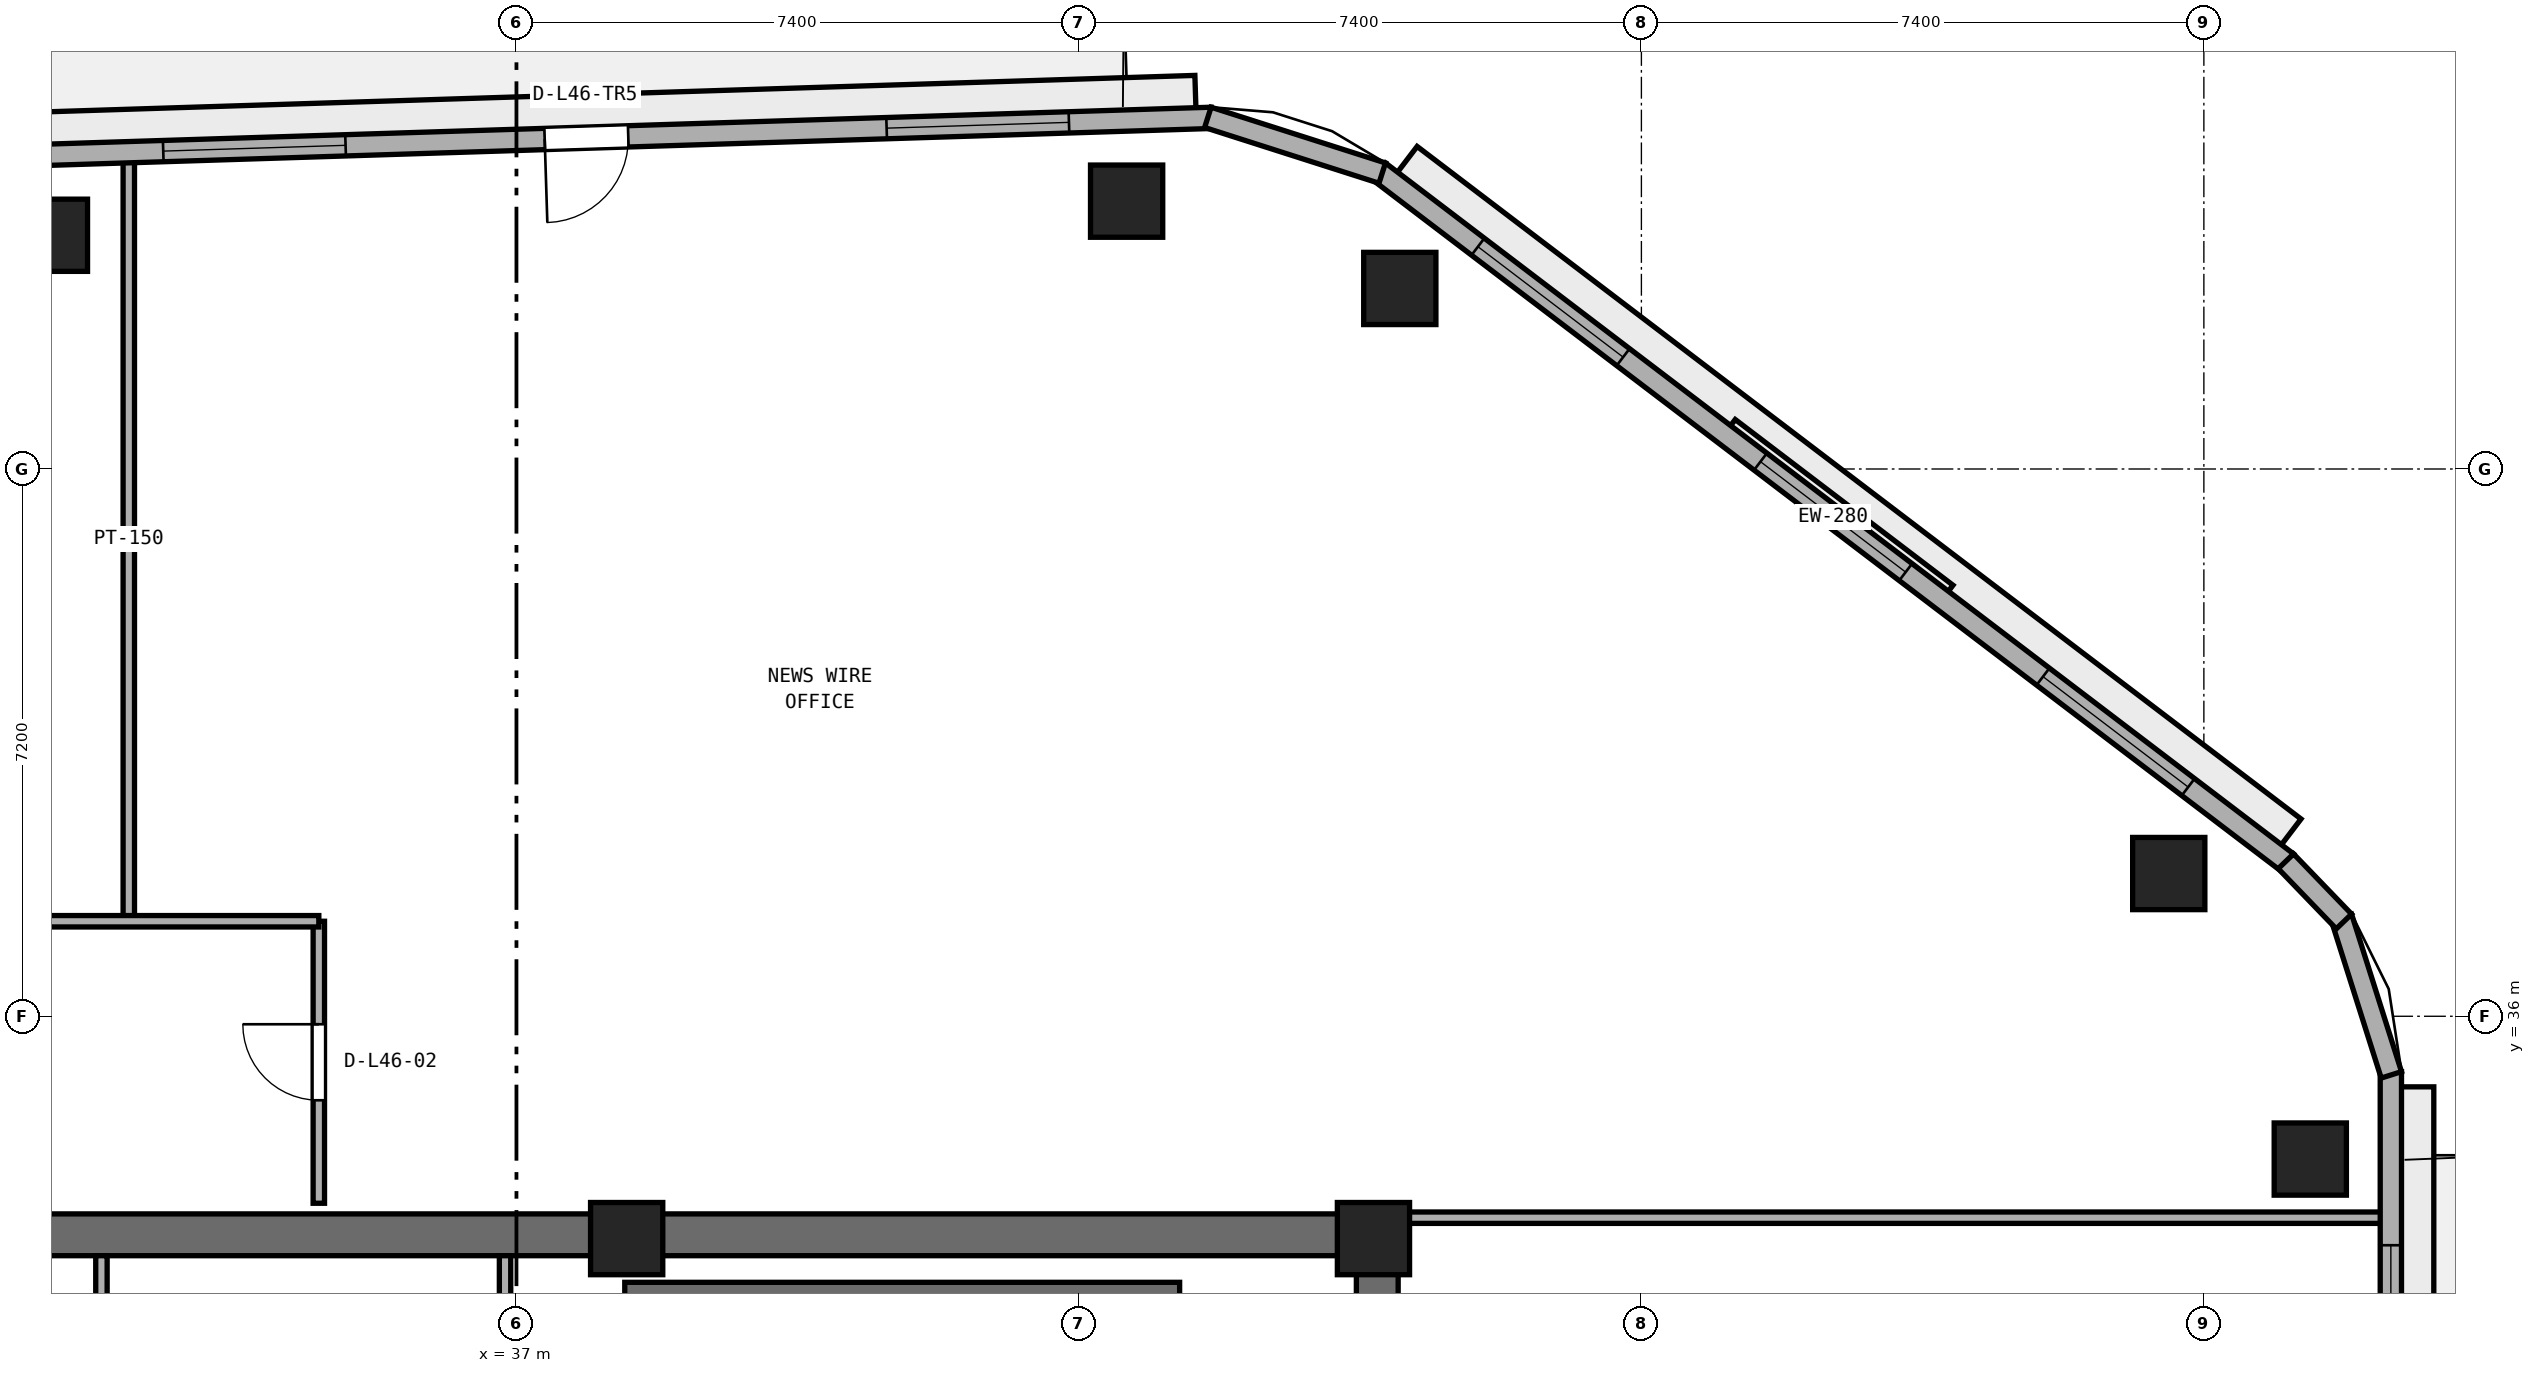
"""IFC4 building model, lengths in metres.
Left out: names, types, materials, properties, quantities, classifications, styles, units other than length and angle.
Written with IfcOpenShell. Run it as: python <this file> out.ifc"""

import sys

from ifc_helpers import new_model, si_unit, direction, frame, frame_2d, origin, origin_2d, place, context, subcontext, project, spatial, rectangle, extrude, element, fill, save


model = new_model("IFC4")
c1 = context("Model", 3, precision=1e-05, world=origin(), true_north=direction((0.0, 1.0)))
c2 = subcontext(c1, "Body", "Model", "MODEL_VIEW")
j1 = project(units=[si_unit("LENGTHUNIT", "METRE"), si_unit("PLANEANGLEUNIT", "RADIAN")], contexts=[c1])
p1 = place(None, origin())
s1 = spatial("IfcSite", under=j1, at=p1, CompositionType="ELEMENT")
p2 = place(p1, origin())
s2 = spatial("IfcBuilding", under=s1, at=p2, CompositionType="ELEMENT")
p3 = place(p2, frame((0.0, 0.0, 182.0)))
s3 = spatial("IfcBuildingStorey", under=s2, at=p3, CompositionType="ELEMENT", Elevation=182.0)
p4 = place(p3, frame((25.4, 33.125, 0.0), z_axis=(0.0, 0.0, 1.0), x_axis=(1.0, 0.0, 0.0)))
e1 = element("IfcWall", 1, at=p4, inside=s3, PredefinedType="SHEAR", context=c2, shape_type="SweptSolid", body=[
    extrude(rectangle(XDim=23.2, YDim=0.55, at=frame_2d((11.6, 0.0))), origin(), (0.0, 0.0, 1.0), 3.54),
])
p5 = place(p3, frame((48.325, 17.55, 0.0), z_axis=(0.0, 0.0, 1.0), x_axis=(0.0, 1.0, 0.0)))
e2 = element("IfcWall", 2, at=p5, inside=s3, PredefinedType="SHEAR", context=c2, shape_type="SweptSolid", body=[
    extrude(rectangle(XDim=15.3, YDim=0.55, at=frame_2d((7.65, 0.0))), origin(), (0.0, 0.0, 1.0), 3.54),
])
p6 = place(p5, frame((5.75, 0.0, 0.0)))
e3 = element("IfcOpeningElement", 3, at=p6, cuts=e2, PredefinedType="OPENING", context=c2, shape_type="SweptSolid", body=[
    extrude(rectangle(XDim=1.5, YDim=2.15, at=frame_2d((0.75, 1.075))), frame((0.0, 0.285, 0.0), z_axis=(0.0, -1.0, 0.0), x_axis=(1.0, 0.0, 0.0)), (0.0, 0.0, 1.0), 0.57),
])
for number, where, z_axis, x_axis in (
    (4, (48.275, 33.075, 0.0), (0.0, 0.0, 1.0), (1.0, 0.0, 0.0)),
    (5, (38.45, 33.075, 0.0), (0.0, 0.0, 1.0), (1.0, 0.0, 0.0)),
):
    element("IfcColumn", number, at=place(p3, frame(where, z_axis=z_axis, x_axis=x_axis)), inside=s3, PredefinedType="PILASTER", context=c2, shape_type="SweptSolid", body=[
        extrude(rectangle(XDim=0.95, YDim=0.95, at=origin_2d()), origin(), (0.0, 0.0, 1.0), 3.8),
    ])
for number, where, z_axis, x_axis in (
    (6, (60.6, 34.122, 0.0), (0.0, 0.0, 1.0), (1.0, 0.0, 0.0)),
    (7, (58.738, 37.878, 0.0), (0.0, 0.0, 1.0), (1.0, 0.0, 0.0)),
    (8, (48.622, 45.575, 0.0), (0.0, 0.0, 1.0), (1.0, 0.0, 0.0)),
    (9, (45.028, 46.724, 0.0), (0.0, 0.0, 1.0), (1.0, 0.0, 0.0)),
    (10, (30.882, 46.275, 0.0), (0.0, 0.0, 1.0), (1.0, 0.0, 0.0)),
):
    element("IfcColumn", number, at=place(p3, frame(where, z_axis=z_axis, x_axis=x_axis)), inside=s3, PredefinedType="COLUMN", context=c2, shape_type="SweptSolid", body=[
        extrude(rectangle(XDim=0.95, YDim=0.95, at=origin_2d()), origin(), (0.0, 0.0, 1.0), 3.8),
    ])
p7 = place(p3, frame((38.425, 32.375, 0.0), z_axis=(0.0, 0.0, 1.0), x_axis=(1.0, 0.0, 0.0)))
e11 = element("IfcWall", 11, at=p7, inside=s3, PredefinedType="SHEAR", context=c2, shape_type="SweptSolid", body=[
    extrude(rectangle(XDim=7.3, YDim=0.25, at=frame_2d((3.65, 0.0))), origin(), (0.0, 0.0, 1.0), 3.54),
])
for number, where, z_axis, x_axis in (
    (12, (31.54, 30.65, 0.0), (0.0, 0.0, 1.0), (0.0, 1.0, 0.0)),
    (13, (36.85, 30.65, 0.0), (0.0, 0.0, 1.0), (0.0, 1.0, 0.0)),
):
    element("IfcWall", number, at=place(p3, frame(where, z_axis=z_axis, x_axis=x_axis)), inside=s3, PredefinedType="PARTITIONING", context=c2, shape_type="SweptSolid", body=[
        extrude(rectangle(XDim=2.2, YDim=0.15, at=frame_2d((1.1, 0.0))), origin(), (0.0, 0.0, 1.0), 3.54),
    ])
p8 = place(p3, frame((34.4, 33.54, 0.0), z_axis=(0.0, 0.0, 1.0), x_axis=(0.0, 1.0, 0.0)))
e14 = element("IfcWall", 14, at=p8, inside=s3, PredefinedType="PARTITIONING", context=c2, shape_type="SweptSolid", body=[
    extrude(rectangle(XDim=3.71, YDim=0.15, at=frame_2d((1.855, 0.0))), origin(), (0.0, 0.0, 1.0), 3.54),
])
p9 = place(p8, frame((1.355, 0.0, 0.0)))
e15 = element("IfcOpeningElement", 15, at=p9, cuts=e14, PredefinedType="OPENING", context=c2, shape_type="SweptSolid", body=[
    extrude(rectangle(XDim=1.0, YDim=2.12, at=frame_2d((0.5, 1.06))), frame((0.0, 0.085, 0.0), z_axis=(0.0, -1.0, 0.0), x_axis=(1.0, 0.0, 0.0)), (0.0, 0.0, 1.0), 0.17),
])
p10 = place(p3, frame((31.9, 37.25, 0.0), z_axis=(0.0, 0.0, 1.0), x_axis=(0.0, 1.0, 0.0)))
e16 = element("IfcWall", 16, at=p10, inside=s3, PredefinedType="PARTITIONING", context=c2, shape_type="SweptSolid", body=[
    extrude(rectangle(XDim=10.053, YDim=0.15, at=frame_2d((5.026, 0.0))), origin(), (0.0, 0.0, 1.0), 3.54),
])
p11 = place(p3, frame((48.74, 33.35, 0.0), z_axis=(0.0, 0.0, 1.0), x_axis=(1.0, 0.0, 0.0)))
e17 = element("IfcWall", 17, at=p11, inside=s3, PredefinedType="PARTITIONING", context=c2, shape_type="SweptSolid", body=[
    extrude(rectangle(XDim=12.855, YDim=0.15, at=frame_2d((6.427, 0.0))), origin(), (0.0, 0.0, 1.0), 2.923),
])
p12 = place(p3, frame((21.55, 37.25, 0.0), z_axis=(0.0, 0.0, 1.0), x_axis=(1.0, 0.0, 0.0)))
e18 = element("IfcWall", 18, at=p12, inside=s3, PredefinedType="PARTITIONING", context=c2, shape_type="SweptSolid", body=[
    extrude(rectangle(XDim=12.85, YDim=0.15, at=frame_2d((6.425, 0.0))), origin(), (0.0, 0.0, 1.0), 3.54),
])
p13 = place(p12, frame((4.795, 0.0, 0.0)))
e19 = element("IfcOpeningElement", 19, at=p13, cuts=e18, PredefinedType="OPENING", context=c2, shape_type="SweptSolid", body=[
    extrude(rectangle(XDim=1.0, YDim=2.12, at=frame_2d((0.5, 1.06))), frame((0.0, 0.085, 0.0), z_axis=(0.0, -1.0, 0.0), x_axis=(1.0, 0.0, 0.0)), (0.0, 0.0, 1.0), 0.17),
])
p14 = place(p3, frame((61.66, 16.369, 0.0), z_axis=(0.0, 0.0, 1.0), x_axis=(0.0, 1.0, 0.0)))
e20 = element("IfcWall", 20, at=p14, inside=s3, PredefinedType="STANDARD", context=c2, shape_type="SweptSolid", body=[
    extrude(rectangle(XDim=18.902, YDim=0.28, at=frame_2d((9.451, 0.0))), origin(), (0.0, 0.0, 1.0), 3.54),
])
p15 = place(p14, frame((8.601, 0.0, 0.0)))
e21 = element("IfcOpeningElement", 21, at=p15, cuts=e20, PredefinedType="OPENING", context=c2, shape_type="SweptSolid", body=[
    extrude(rectangle(XDim=1.1, YDim=2.2, at=frame_2d((0.55, 1.1))), frame((0.0, 0.15, 0.0), z_axis=(0.0, -1.0, 0.0), x_axis=(1.0, 0.0, 0.0)), (0.0, 0.0, 1.0), 0.3),
])
p16 = place(p14, frame((2.034, 0.0, 0.9)))
e22 = element("IfcOpeningElement", 22, at=p16, cuts=e20, PredefinedType="OPENING", context=c2, shape_type="SweptSolid", body=[
    extrude(rectangle(XDim=2.4, YDim=1.75, at=frame_2d((1.2, 0.875))), frame((0.0, 0.15, 0.0), z_axis=(0.0, -1.0, 0.0), x_axis=(1.0, 0.0, 0.0)), (0.0, 0.0, 1.0), 0.3),
])
p17 = place(p14, frame((14.219, 0.0, 0.9)))
e23 = element("IfcOpeningElement", 23, at=p17, cuts=e20, PredefinedType="OPENING", context=c2, shape_type="SweptSolid", body=[
    extrude(rectangle(XDim=2.4, YDim=1.75, at=frame_2d((1.2, 0.875))), frame((0.0, 0.15, 0.0), z_axis=(0.0, -1.0, 0.0), x_axis=(1.0, 0.0, 0.0)), (0.0, 0.0, 1.0), 0.3),
])
p18 = place(p3, frame((60.295, 38.025, 0.0), z_axis=(0.0, 0.0, 1.0), x_axis=(-0.795831760834, 0.605517801925, 0.0)))
e24 = element("IfcWall", 24, at=p18, inside=s3, PredefinedType="STANDARD", context=c2, shape_type="SweptSolid", body=[
    extrude(rectangle(XDim=15.012, YDim=0.28, at=frame_2d((7.506, 0.0))), origin(), (0.0, 0.0, 1.0), 3.54),
])
p19 = place(p18, frame((1.635, 0.0, 0.9)))
e25 = element("IfcOpeningElement", 25, at=p19, cuts=e24, PredefinedType="OPENING", context=c2, shape_type="SweptSolid", body=[
    extrude(rectangle(XDim=2.4, YDim=1.75, at=frame_2d((1.2, 0.875))), frame((0.0, 0.15, 0.0), z_axis=(0.0, -1.0, 0.0), x_axis=(1.0, 0.0, 0.0)), (0.0, 0.0, 1.0), 0.3),
])
p20 = place(p18, frame((6.306, 0.0, 0.9)))
e26 = element("IfcOpeningElement", 26, at=p20, cuts=e24, PredefinedType="OPENING", context=c2, shape_type="SweptSolid", body=[
    extrude(rectangle(XDim=2.4, YDim=1.75, at=frame_2d((1.2, 0.875))), frame((0.0, 0.15, 0.0), z_axis=(0.0, -1.0, 0.0), x_axis=(1.0, 0.0, 0.0)), (0.0, 0.0, 1.0), 0.3),
])
p21 = place(p18, frame((10.977, 0.0, 0.9)))
e27 = element("IfcOpeningElement", 27, at=p21, cuts=e24, PredefinedType="OPENING", context=c2, shape_type="SweptSolid", body=[
    extrude(rectangle(XDim=2.4, YDim=1.75, at=frame_2d((1.2, 0.875))), frame((0.0, 0.15, 0.0), z_axis=(0.0, -1.0, 0.0), x_axis=(1.0, 0.0, 0.0)), (0.0, 0.0, 1.0), 0.3),
])
p22 = place(p3, frame((46.143, 47.82, 0.0), z_axis=(0.0, 0.0, 1.0), x_axis=(-0.999497065256, -0.031711457627, 0.0)))
e28 = element("IfcWall", 28, at=p22, inside=s3, PredefinedType="STANDARD", context=c2, shape_type="SweptSolid", body=[
    extrude(rectangle(XDim=16.452, YDim=0.28, at=frame_2d((8.226, 0.0))), origin(), (0.0, 0.0, 1.0), 3.54),
])
p23 = place(p22, frame((7.676, 0.0, 0.0)))
e29 = element("IfcOpeningElement", 29, at=p23, cuts=e28, PredefinedType="OPENING", context=c2, shape_type="SweptSolid", body=[
    extrude(rectangle(XDim=1.1, YDim=2.2, at=frame_2d((0.55, 1.1))), frame((0.0, 0.15, 0.0), z_axis=(0.0, -1.0, 0.0), x_axis=(1.0, 0.0, 0.0)), (0.0, 0.0, 1.0), 0.3),
])
p24 = place(p22, frame((1.875, 0.0, 0.9)))
e30 = element("IfcOpeningElement", 30, at=p24, cuts=e28, PredefinedType="OPENING", context=c2, shape_type="SweptSolid", body=[
    extrude(rectangle(XDim=2.4, YDim=1.75, at=frame_2d((1.2, 0.875))), frame((0.0, 0.15, 0.0), z_axis=(0.0, -1.0, 0.0), x_axis=(1.0, 0.0, 0.0)), (0.0, 0.0, 1.0), 0.3),
])
p25 = place(p22, frame((11.397, 0.0, 0.9)))
e31 = element("IfcOpeningElement", 31, at=p25, cuts=e28, PredefinedType="OPENING", context=c2, shape_type="SweptSolid", body=[
    extrude(rectangle(XDim=2.4, YDim=1.75, at=frame_2d((1.2, 0.875))), frame((0.0, 0.15, 0.0), z_axis=(0.0, -1.0, 0.0), x_axis=(1.0, 0.0, 0.0)), (0.0, 0.0, 1.0), 0.3),
])
p26 = place(p3, frame((61.667, 35.229, 0.0), z_axis=(0.0, 0.0, 1.0), x_axis=(-0.302044777107, 0.953293738898, 0.0)))
e32 = element("IfcWall", 32, at=p26, inside=s3, PredefinedType="STANDARD", context=c2, shape_type="SweptSolid", body=[
    extrude(rectangle(XDim=2.174, YDim=0.28, at=frame_2d((1.087, 0.0))), origin(), (0.0, 0.0, 1.0), 3.54),
])
p27 = place(p3, frame((61.042, 37.247, 0.0), z_axis=(0.0, 0.0, 1.0), x_axis=(-0.694004126367, 0.719971022045, 0.0)))
e33 = element("IfcWall", 33, at=p27, inside=s3, PredefinedType="STANDARD", context=c2, shape_type="SweptSolid", body=[
    extrude(rectangle(XDim=1.1, YDim=0.28, at=frame_2d((0.55, 0.0))), origin(), (0.0, 0.0, 1.0), 3.54),
])
p28 = place(p3, frame((48.39, 47.093, 0.0), z_axis=(0.0, 0.0, 1.0), x_axis=(-0.952542948918, 0.304404222156, 0.0)))
e34 = element("IfcWall", 34, at=p28, inside=s3, PredefinedType="STANDARD", context=c2, shape_type="SweptSolid", body=[
    extrude(rectangle(XDim=2.408, YDim=0.28, at=frame_2d((1.204, 0.0))), origin(), (0.0, 0.0, 1.0), 3.54),
])
p29 = place(p9, origin())
e35 = element("IfcDoor", 35, at=p29, inside=s3, OperationType="SINGLE_SWING_RIGHT", PredefinedType="DOOR", context=c2, shape_type="SweptSolid", body=[
    extrude(rectangle(XDim=1.0, YDim=2.12, at=frame_2d((0.5, 1.06))), frame((0.0, 0.025, 0.0), z_axis=(0.0, -1.0, 0.0), x_axis=(1.0, 0.0, 0.0)), (0.0, 0.0, 1.0), 0.05),
])
fill(e15, e35)
p30 = place(p17, origin())
e36 = element("IfcWindow", 36, at=p30, inside=s3, PartitioningType="SINGLE_PANEL", PredefinedType="WINDOW", context=c2, shape_type="SweptSolid", body=[
    extrude(rectangle(XDim=2.4, YDim=1.75, at=frame_2d((1.2, 0.875))), frame((0.0, 0.03, 0.0), z_axis=(0.0, -1.0, 0.0), x_axis=(1.0, 0.0, 0.0)), (0.0, 0.0, 1.0), 0.06),
])
fill(e23, e36)
p31 = place(p19, origin())
e37 = element("IfcWindow", 37, at=p31, inside=s3, PartitioningType="SINGLE_PANEL", PredefinedType="WINDOW", context=c2, shape_type="SweptSolid", body=[
    extrude(rectangle(XDim=2.4, YDim=1.75, at=frame_2d((1.2, 0.875))), frame((0.0, 0.03, 0.0), z_axis=(0.0, -1.0, 0.0), x_axis=(1.0, 0.0, 0.0)), (0.0, 0.0, 1.0), 0.06),
])
fill(e25, e37)
p32 = place(p20, origin())
e38 = element("IfcWindow", 38, at=p32, inside=s3, PartitioningType="SINGLE_PANEL", PredefinedType="WINDOW", context=c2, shape_type="SweptSolid", body=[
    extrude(rectangle(XDim=2.4, YDim=1.75, at=frame_2d((1.2, 0.875))), frame((0.0, 0.03, 0.0), z_axis=(0.0, -1.0, 0.0), x_axis=(1.0, 0.0, 0.0)), (0.0, 0.0, 1.0), 0.06),
])
fill(e26, e38)
p33 = place(p21, origin())
e39 = element("IfcWindow", 39, at=p33, inside=s3, PartitioningType="SINGLE_PANEL", PredefinedType="WINDOW", context=c2, shape_type="SweptSolid", body=[
    extrude(rectangle(XDim=2.4, YDim=1.75, at=frame_2d((1.2, 0.875))), frame((0.0, 0.03, 0.0), z_axis=(0.0, -1.0, 0.0), x_axis=(1.0, 0.0, 0.0)), (0.0, 0.0, 1.0), 0.06),
])
fill(e27, e39)
p34 = place(p23, origin())
e40 = element("IfcDoor", 40, at=p34, inside=s3, OperationType="SINGLE_SWING_RIGHT", PredefinedType="DOOR", context=c2, shape_type="SweptSolid", body=[
    extrude(rectangle(XDim=1.1, YDim=2.2, at=frame_2d((0.55, 1.1))), frame((0.0, 0.025, 0.0), z_axis=(0.0, -1.0, 0.0), x_axis=(1.0, 0.0, 0.0)), (0.0, 0.0, 1.0), 0.05),
])
fill(e29, e40)
p35 = place(p24, origin())
e41 = element("IfcWindow", 41, at=p35, inside=s3, PartitioningType="SINGLE_PANEL", PredefinedType="WINDOW", context=c2, shape_type="SweptSolid", body=[
    extrude(rectangle(XDim=2.4, YDim=1.75, at=frame_2d((1.2, 0.875))), frame((0.0, 0.03, 0.0), z_axis=(0.0, -1.0, 0.0), x_axis=(1.0, 0.0, 0.0)), (0.0, 0.0, 1.0), 0.06),
])
fill(e30, e41)
p36 = place(p25, origin())
e42 = element("IfcWindow", 42, at=p36, inside=s3, PartitioningType="SINGLE_PANEL", PredefinedType="WINDOW", context=c2, shape_type="SweptSolid", body=[
    extrude(rectangle(XDim=2.4, YDim=1.75, at=frame_2d((1.2, 0.875))), frame((0.0, 0.03, 0.0), z_axis=(0.0, -1.0, 0.0), x_axis=(1.0, 0.0, 0.0)), (0.0, 0.0, 1.0), 0.06),
])
fill(e31, e42)
save(model, sys.argv[1])
